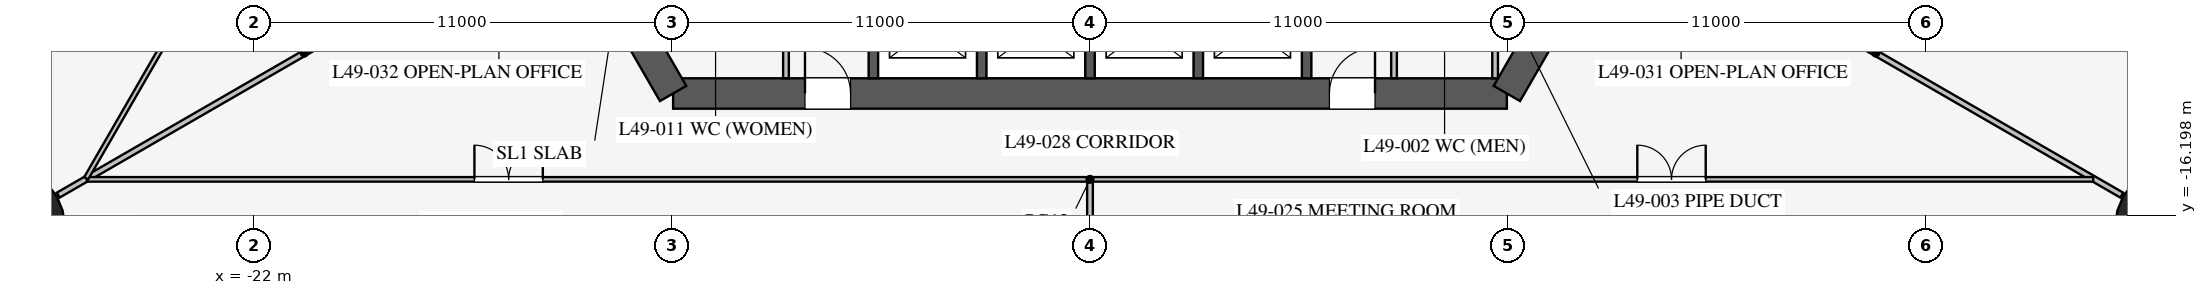
"""IFC4 building model, lengths in metres.
Left out: names, types, materials, properties, quantities, classifications, styles, units other than length and angle.
Written with IfcOpenShell. Run it as: python <this file> out.ifc"""

import sys

from ifc_helpers import new_model, si_unit, direction, frame, frame_2d, origin, origin_2d, place, context, subcontext, project, spatial, rectangle, circle, extrude, element, fill, save


model = new_model("IFC4")
c1 = context("Model", 3, precision=1e-05, world=origin(), true_north=direction((0.0, 1.0)))
c2 = subcontext(c1, "Body", "Model", "MODEL_VIEW")
j1 = project(units=[si_unit("LENGTHUNIT", "METRE"), si_unit("PLANEANGLEUNIT", "RADIAN")], contexts=[c1])
p1 = place(None, origin())
s1 = spatial("IfcSite", under=j1, at=p1, CompositionType="ELEMENT")
p2 = place(p1, origin())
s2 = spatial("IfcBuilding", under=s1, at=p2, CompositionType="ELEMENT")
p3 = place(p2, frame((0.0, 0.0, 214.9)))
s3 = spatial("IfcBuildingStorey", under=s2, at=p3, CompositionType="ELEMENT", Elevation=214.9)
for number, where, z_axis, x_axis in (
    (1, (28.579, -16.5, 0.0), (0.0, 0.0, 1.0), (1.0, 0.0, 0.0)),
    (2, (-28.579, -16.5, 0.0), (0.0, 0.0, 1.0), (1.0, 0.0, 0.0)),
):
    element("IfcColumn", number, at=place(p3, frame(where, z_axis=z_axis, x_axis=x_axis)), inside=s3, PredefinedType="COLUMN", context=c2, shape_type="SweptSolid", body=[
        extrude(circle(Radius=1.6, at=origin_2d()), origin(), (0.0, 0.0, 1.0), 4.2),
    ])
p4 = place(p3, frame((-10.97, -13.0, 0.0), z_axis=(0.0, 0.0, 1.0), x_axis=(1.0, 0.0, 0.0)))
e3 = element("IfcWall", 3, at=p4, inside=s3, PredefinedType="SHEAR", context=c2, shape_type="SweptSolid", body=[
    extrude(rectangle(XDim=21.939, YDim=0.8, at=frame_2d((10.97, 0.0))), origin(), (0.0, 0.0, 1.0), 4.2),
])
p5 = place(p4, frame((17.27, 0.0, 0.0)))
e4 = element("IfcOpeningElement", 4, at=p5, cuts=e3, PredefinedType="OPENING", context=c2, shape_type="SweptSolid", body=[
    extrude(rectangle(XDim=1.2, YDim=2.1, at=frame_2d((0.6, 1.05))), frame((0.0, 0.41, 0.0), z_axis=(0.0, -1.0, 0.0), x_axis=(1.0, 0.0, 0.0)), (0.0, 0.0, 1.0), 0.82),
])
p6 = place(p4, frame((3.47, 0.0, 0.0)))
e5 = element("IfcOpeningElement", 5, at=p6, cuts=e3, PredefinedType="OPENING", context=c2, shape_type="SweptSolid", body=[
    extrude(rectangle(XDim=1.2, YDim=2.1, at=frame_2d((0.6, 1.05))), frame((0.0, 0.41, 0.0), z_axis=(0.0, -1.0, 0.0), x_axis=(1.0, 0.0, 0.0)), (0.0, 0.0, 1.0), 0.82),
])
for number, where, z_axis, x_axis in (
    (6, (10.97, -13.0, 0.0), (0.0, 0.0, 1.0), (0.5, 0.866, 0.0)),
    (7, (-16.743, -3.0, 0.0), (0.0, 0.0, 1.0), (0.5, -0.866, 0.0)),
):
    element("IfcWall", number, at=place(p3, frame(where, z_axis=z_axis, x_axis=x_axis)), inside=s3, PredefinedType="SHEAR", context=c2, shape_type="SweptSolid", body=[
        extrude(rectangle(XDim=11.547, YDim=0.8, at=frame_2d((5.773, 0.0))), origin(), (0.0, 0.0, 1.0), 4.2),
    ])
for number, where, z_axis, x_axis in (
    (8, (-5.7, -10.025, 0.0), (0.0, 0.0, 1.0), (0.0, -1.0, 0.0)),
    (9, (-2.85, -10.025, 0.0), (0.0, 0.0, 1.0), (0.0, -1.0, 0.0)),
    (10, (0.0, -10.025, 0.0), (0.0, 0.0, 1.0), (0.0, -1.0, 0.0)),
    (11, (2.85, -10.025, 0.0), (0.0, 0.0, 1.0), (0.0, -1.0, 0.0)),
    (12, (5.7, -10.025, 0.0), (0.0, 0.0, 1.0), (0.0, -1.0, 0.0)),
):
    element("IfcWall", number, at=place(p3, frame(where, z_axis=z_axis, x_axis=x_axis)), inside=s3, PredefinedType="SHEAR", context=c2, shape_type="SweptSolid", body=[
        extrude(rectangle(XDim=2.575, YDim=0.25, at=frame_2d((1.288, 0.0))), origin(), (0.0, 0.0, 1.0), 4.2),
    ])
p7 = place(p3, frame((8.0, -7.5, 0.0), z_axis=(0.0, 0.0, 1.0), x_axis=(0.0, -1.0, 0.0)))
e13 = element("IfcWall", 13, at=p7, inside=s3, PredefinedType="PARTITIONING", context=c2, shape_type="SweptSolid", body=[
    extrude(rectangle(XDim=5.1, YDim=0.15, at=frame_2d((2.55, 0.0))), origin(), (0.0, 0.0, 1.0), 4.0),
])
p8 = place(p7, frame((1.3, 0.0, 0.0)))
e14 = element("IfcOpeningElement", 14, at=p8, cuts=e13, PredefinedType="OPENING", context=c2, shape_type="SweptSolid", body=[
    extrude(rectangle(XDim=0.9, YDim=2.1, at=frame_2d((0.45, 1.05))), frame((0.0, 0.085, 0.0), z_axis=(0.0, -1.0, 0.0), x_axis=(1.0, 0.0, 0.0)), (0.0, 0.0, 1.0), 0.17),
])
p9 = place(p3, frame((-8.0, -7.5, 0.0), z_axis=(0.0, 0.0, 1.0), x_axis=(0.0, -1.0, 0.0)))
e15 = element("IfcWall", 15, at=p9, inside=s3, PredefinedType="PARTITIONING", context=c2, shape_type="SweptSolid", body=[
    extrude(rectangle(XDim=5.1, YDim=0.15, at=frame_2d((2.55, 0.0))), origin(), (0.0, 0.0, 1.0), 4.0),
])
p10 = place(p9, frame((2.6, 0.0, 0.0)))
e16 = element("IfcOpeningElement", 16, at=p10, cuts=e15, PredefinedType="OPENING", context=c2, shape_type="SweptSolid", body=[
    extrude(rectangle(XDim=0.9, YDim=2.1, at=frame_2d((0.45, 1.05))), frame((0.0, 0.085, 0.0), z_axis=(0.0, -1.0, 0.0), x_axis=(1.0, 0.0, 0.0)), (0.0, 0.0, 1.0), 0.17),
])
p11 = place(p3, frame((10.66, -8.5, 0.0), z_axis=(0.0, 0.0, 1.0), x_axis=(0.0, -1.0, 0.0)))
e17 = element("IfcWall", 17, at=p11, inside=s3, PredefinedType="PARTITIONING", context=c2, shape_type="SweptSolid", body=[
    extrude(rectangle(XDim=4.1, YDim=0.15, at=frame_2d((2.05, 0.0))), origin(), (0.0, 0.0, 1.0), 4.0),
])
for number, where, z_axis, x_axis in (
    (18, (14.203, -8.2, 0.0), (0.0, 0.0, 1.0), (0.866, -0.5, 0.0)),
    (19, (-14.203, -8.2, 0.0), (0.0, 0.0, 1.0), (-0.866, -0.5, 0.0)),
):
    element("IfcWall", number, at=place(p3, frame(where, z_axis=z_axis, x_axis=x_axis)), inside=s3, PredefinedType="PARTITIONING", context=c2, shape_type="SweptSolid", body=[
        extrude(rectangle(XDim=14.95, YDim=0.15, at=frame_2d((7.475, 0.0))), origin(), (0.0, 0.0, 1.0), 2.4),
    ])
p12 = place(p3, frame((0.0, -15.32, 0.0), z_axis=(0.0, 0.0, 1.0), x_axis=(0.0, -1.0, 0.0)))
e20 = element("IfcWall", 20, at=p12, inside=s3, PredefinedType="PARTITIONING", context=c2, shape_type="SweptSolid", body=[
    extrude(rectangle(XDim=8.451, YDim=0.15, at=frame_2d((4.225, 0.0))), origin(), (0.0, 0.0, 1.0), 3.3),
])
p13 = place(p3, frame((-26.398, -15.26, 0.0), z_axis=(0.0, 0.0, 1.0), x_axis=(1.0, 0.0, 0.0)))
e21 = element("IfcWall", 21, at=p13, inside=s3, PredefinedType="PARTITIONING", context=c2, shape_type="SweptSolid", body=[
    extrude(rectangle(XDim=52.796, YDim=0.12, at=frame_2d((26.398, 0.0))), origin(), (0.0, 0.0, 1.0), 2.9),
])
p14 = place(p13, frame((10.2, 0.0, 0.15)))
e22 = element("IfcOpeningElement", 22, at=p14, cuts=e21, PredefinedType="OPENING", context=c2, shape_type="SweptSolid", body=[
    extrude(rectangle(XDim=1.8, YDim=2.1, at=frame_2d((0.9, 1.05))), frame((0.0, 0.07, 0.0), z_axis=(0.0, -1.0, 0.0), x_axis=(1.0, 0.0, 0.0)), (0.0, 0.0, 1.0), 0.14),
])
p15 = place(p13, frame((40.8, 0.0, 0.15)))
e23 = element("IfcOpeningElement", 23, at=p15, cuts=e21, PredefinedType="OPENING", context=c2, shape_type="SweptSolid", body=[
    extrude(rectangle(XDim=1.8, YDim=2.1, at=frame_2d((0.9, 1.05))), frame((0.0, 0.07, 0.0), z_axis=(0.0, -1.0, 0.0), x_axis=(1.0, 0.0, 0.0)), (0.0, 0.0, 1.0), 0.14),
])
p16 = place(p3, frame((-0.016, 30.491, 0.0), z_axis=(0.0, 0.0, 1.0), x_axis=(-0.50000091641, -0.866024874695, 0.0)))
e24 = element("IfcWall", 24, at=p16, inside=s3, PredefinedType="PARTITIONING", context=c2, shape_type="SweptSolid", body=[
    extrude(rectangle(XDim=52.796, YDim=0.12, at=frame_2d((26.398, 0.0))), origin(), (0.0, 0.0, 1.0), 2.9),
])
p17 = place(p16, frame((10.2, 0.0, 0.15)))
e25 = element("IfcOpeningElement", 25, at=p17, cuts=e24, PredefinedType="OPENING", context=c2, shape_type="SweptSolid", body=[
    extrude(rectangle(XDim=1.8, YDim=2.1, at=frame_2d((0.9, 1.05))), frame((0.0, 0.07, 0.0), z_axis=(0.0, -1.0, 0.0), x_axis=(1.0, 0.0, 0.0)), (0.0, 0.0, 1.0), 0.14),
])
p18 = place(p16, frame((40.8, 0.0, 0.15)))
e26 = element("IfcOpeningElement", 26, at=p18, cuts=e24, PredefinedType="OPENING", context=c2, shape_type="SweptSolid", body=[
    extrude(rectangle(XDim=1.8, YDim=2.1, at=frame_2d((0.9, 1.05))), frame((0.0, 0.07, 0.0), z_axis=(0.0, -1.0, 0.0), x_axis=(1.0, 0.0, 0.0)), (0.0, 0.0, 1.0), 0.14),
])
p19 = place(p5, origin())
e27 = element("IfcDoor", 27, at=p19, inside=s3, OperationType="SINGLE_SWING_RIGHT", PredefinedType="DOOR", context=c2, shape_type="SweptSolid", body=[
    extrude(rectangle(XDim=1.2, YDim=2.1, at=frame_2d((0.6, 1.05))), frame((0.0, 0.025, 0.0), z_axis=(0.0, -1.0, 0.0), x_axis=(1.0, 0.0, 0.0)), (0.0, 0.0, 1.0), 0.05),
])
fill(e4, e27)
p20 = place(p6, origin())
e28 = element("IfcDoor", 28, at=p20, inside=s3, OperationType="SINGLE_SWING_LEFT", PredefinedType="DOOR", context=c2, shape_type="SweptSolid", body=[
    extrude(rectangle(XDim=1.2, YDim=2.1, at=frame_2d((0.6, 1.05))), frame((0.0, 0.025, 0.0), z_axis=(0.0, -1.0, 0.0), x_axis=(1.0, 0.0, 0.0)), (0.0, 0.0, 1.0), 0.05),
])
fill(e5, e28)
p21 = place(p14, origin())
e29 = element("IfcDoor", 29, at=p21, inside=s3, OperationType="DOUBLE_DOOR_SINGLE_SWING", PredefinedType="DOOR", context=c2, shape_type="SweptSolid", body=[
    extrude(rectangle(XDim=1.8, YDim=2.1, at=frame_2d((0.9, 1.05))), frame((0.0, 0.025, 0.0), z_axis=(0.0, -1.0, 0.0), x_axis=(1.0, 0.0, 0.0)), (0.0, 0.0, 1.0), 0.05),
])
fill(e22, e29)
p22 = place(p15, origin())
e30 = element("IfcDoor", 30, at=p22, inside=s3, OperationType="DOUBLE_DOOR_SINGLE_SWING", PredefinedType="DOOR", context=c2, shape_type="SweptSolid", body=[
    extrude(rectangle(XDim=1.8, YDim=2.1, at=frame_2d((0.9, 1.05))), frame((0.0, 0.025, 0.0), z_axis=(0.0, -1.0, 0.0), x_axis=(1.0, 0.0, 0.0)), (0.0, 0.0, 1.0), 0.05),
])
fill(e23, e30)
save(model, sys.argv[1])
